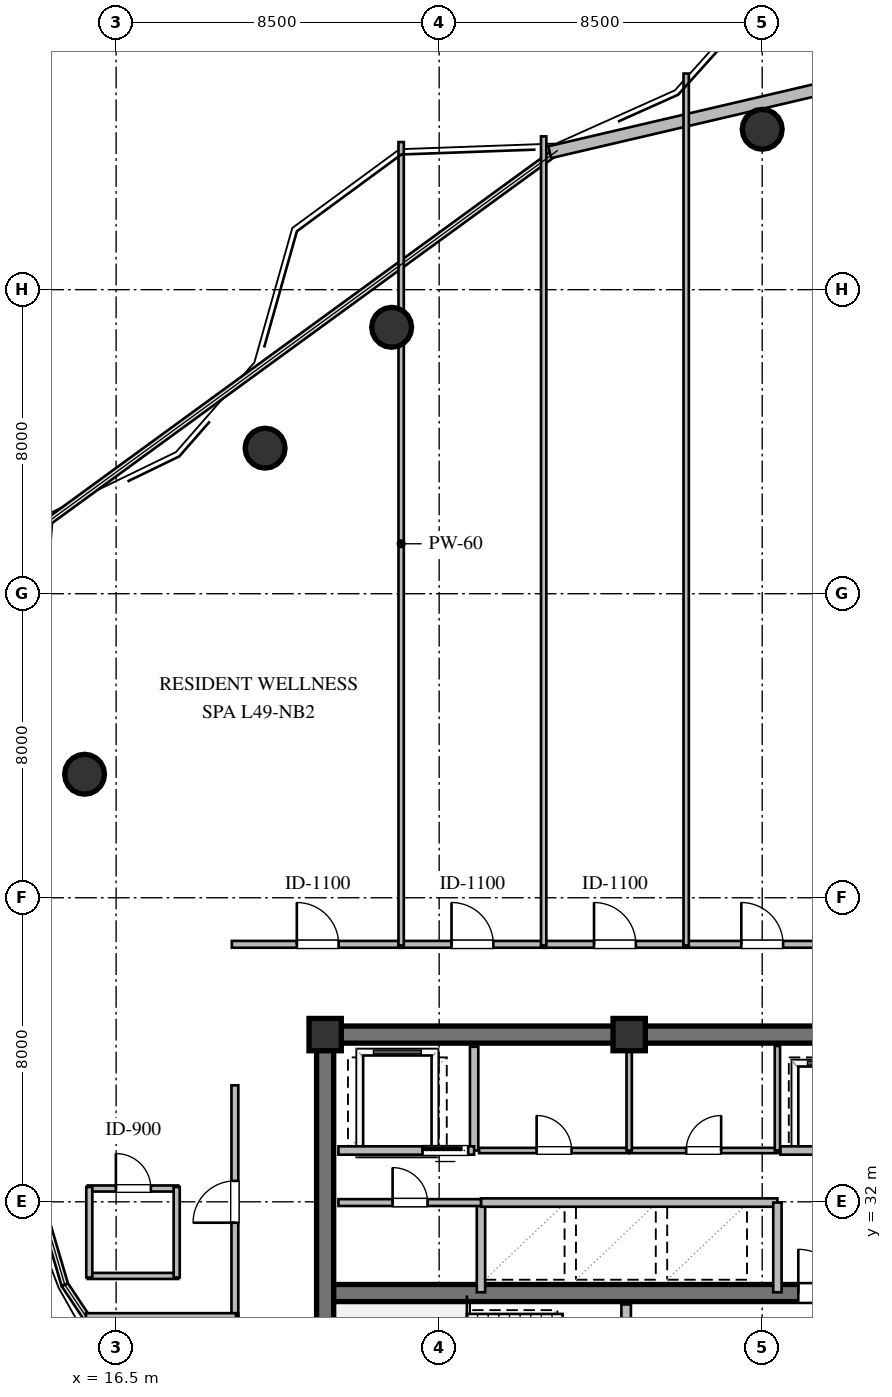
"""IFC4 building model, lengths in metres.
Left out: names, types, materials, properties, quantities, classifications, styles, units other than length and angle.
Written with IfcOpenShell. Run it as: python <this file> out.ifc"""

import sys

from ifc_helpers import new_model, si_unit, direction, frame, frame_2d, origin, origin_2d, place, context, subcontext, project, spatial, rectangle, circle, extrude, element, fill, save


model = new_model("IFC4")
c1 = context("Model", 3, precision=1e-05, world=origin(), true_north=direction((0.0, 1.0)))
c2 = subcontext(c1, "Body", "Model", "MODEL_VIEW")
j1 = project(units=[si_unit("LENGTHUNIT", "METRE"), si_unit("PLANEANGLEUNIT", "RADIAN")], contexts=[c1])
p1 = place(None, origin())
s1 = spatial("IfcSite", under=j1, at=p1, CompositionType="ELEMENT")
p2 = place(p1, origin())
s2 = spatial("IfcBuilding", under=s1, at=p2, CompositionType="ELEMENT")
p3 = place(p2, frame((0.0, 0.0, 187.2)))
s3 = spatial("IfcBuildingStorey", under=s2, at=p3, CompositionType="ELEMENT", Elevation=187.2)
p4 = place(p3, frame((21.775, 36.4, 0.0), z_axis=(0.0, 0.0, 1.0), x_axis=(1.0, 0.0, 0.0)))
e1 = element("IfcWall", 1, at=p4, inside=s3, PredefinedType="SHEAR", context=c2, shape_type="SweptSolid", body=[
    extrude(rectangle(XDim=22.45, YDim=0.45, at=frame_2d((11.225, 0.0))), origin(), (0.0, 0.0, 1.0), 3.28),
])
p5 = place(p3, frame((22.0, 23.825, 0.0), z_axis=(0.0, 0.0, 1.0), x_axis=(0.0, 1.0, 0.0)))
e2 = element("IfcWall", 2, at=p5, inside=s3, PredefinedType="SHEAR", context=c2, shape_type="SweptSolid", body=[
    extrude(rectangle(XDim=12.35, YDim=0.45, at=frame_2d((6.175, 0.0))), origin(), (0.0, 0.0, 1.0), 3.28),
])
p6 = place(p3, frame((22.225, 29.6, 0.0), z_axis=(0.0, 0.0, 1.0), x_axis=(1.0, 0.0, 0.0)))
e3 = element("IfcWall", 3, at=p6, inside=s3, PredefinedType="SHEAR", context=c2, shape_type="SweptSolid", body=[
    extrude(rectangle(XDim=21.55, YDim=0.45, at=frame_2d((10.775, 0.0))), origin(), (0.0, 0.0, 1.0), 3.28),
])
p7 = place(p6, frame((12.225, 0.0, 0.0)))
e4 = element("IfcOpeningElement", 4, at=p7, cuts=e3, PredefinedType="OPENING", context=c2, shape_type="SweptSolid", body=[
    extrude(rectangle(XDim=1.15, YDim=2.1, at=frame_2d((0.575, 1.05))), frame((0.0, 0.235, 0.0), z_axis=(0.0, -1.0, 0.0), x_axis=(1.0, 0.0, 0.0)), (0.0, 0.0, 1.0), 0.47),
])
for number, where, z_axis, x_axis in (
    (5, (30.0, 36.4, 0.0), (0.0, 0.0, 1.0), (1.0, 0.0, 0.0)),
    (6, (22.0, 36.4, 0.0), (0.0, 0.0, 1.0), (1.0, 0.0, 0.0)),
):
    element("IfcColumn", number, at=place(p3, frame(where, z_axis=z_axis, x_axis=x_axis)), inside=s3, PredefinedType="COLUMN", context=c2, shape_type="SweptSolid", body=[
        extrude(rectangle(XDim=0.85, YDim=0.85, at=origin_2d()), origin(), (0.0, 0.0, 1.0), 3.6),
    ])
for number, where, z_axis, x_axis in (
    (7, (33.5, 60.22, -0.24), (0.0, 0.0, 1.0), (1.0, 0.0, 0.0)),
    (8, (23.75, 55.01, -0.24), (0.0, 0.0, 1.0), (1.0, 0.0, 0.0)),
    (9, (20.42, 51.83, -0.24), (0.0, 0.0, 1.0), (1.0, 0.0, 0.0)),
    (10, (15.67, 43.25, -0.24), (0.0, 0.0, 1.0), (1.0, 0.0, 0.0)),
):
    element("IfcColumn", number, at=place(p3, frame(where, z_axis=z_axis, x_axis=x_axis)), inside=s3, PredefinedType="COLUMN", context=c2, shape_type="SweptSolid", body=[
        extrude(circle(Radius=0.525, at=origin_2d()), origin(), (0.0, 0.0, 1.0), 3.84),
    ])
p8 = place(p3, frame((27.909, 59.617, 0.0), z_axis=(0.0, 0.0, 1.0), x_axis=(0.973753606594, 0.227604731158, 0.0)))
e11 = element("IfcWall", 11, at=p8, inside=s3, PredefinedType="STANDARD", context=c2, shape_type="SweptSolid", body=[
    extrude(rectangle(XDim=17.817, YDim=0.32, at=frame_2d((8.908, 0.0))), origin(), (0.0, 0.0, 1.0), 3.28),
])
p9 = place(p8, frame((8.109, 0.0, 1.05)))
e12 = element("IfcOpeningElement", 12, at=p9, cuts=e11, PredefinedType="OPENING", context=c2, shape_type="SweptSolid", body=[
    extrude(rectangle(XDim=1.6, YDim=1.5, at=frame_2d((0.8, 0.75))), frame((0.0, 0.17, 0.0), z_axis=(0.0, -1.0, 0.0), x_axis=(1.0, 0.0, 0.0)), (0.0, 0.0, 1.0), 0.34),
])
p10 = place(p3, frame((29.92, 23.9, 0.0), z_axis=(0.0, 0.0, 1.0), x_axis=(0.0, 1.0, 0.0)))
e13 = element("IfcWall", 13, at=p10, inside=s3, PredefinedType="SOLIDWALL", context=c2, shape_type="SweptSolid", body=[
    extrude(rectangle(XDim=5.4, YDim=0.25, at=frame_2d((2.7, 0.0))), origin(), (0.0, 0.0, 1.0), 3.28),
])
p11 = place(p10, frame((3.421, 0.0, 0.0)))
e14 = element("IfcOpeningElement", 14, at=p11, cuts=e13, PredefinedType="OPENING", context=c2, shape_type="SweptSolid", body=[
    extrude(rectangle(XDim=1.15, YDim=2.1, at=frame_2d((0.575, 1.05))), frame((0.0, 0.135, 0.0), z_axis=(0.0, -1.0, 0.0), x_axis=(1.0, 0.0, 0.0)), (0.0, 0.0, 1.0), 0.27),
])
p12 = place(p3, frame((25.92, 33.35, 0.0), z_axis=(0.0, 0.0, 1.0), x_axis=(0.0, 1.0, 0.0)))
e15 = element("IfcWall", 15, at=p12, inside=s3, PredefinedType="SOLIDWALL", context=c2, shape_type="SweptSolid", body=[
    extrude(rectangle(XDim=2.73, YDim=0.22, at=frame_2d((1.365, 0.0))), origin(), (0.0, 0.0, 1.0), 3.28),
])
p13 = place(p3, frame((22.35, 33.35, 0.0), z_axis=(0.0, 0.0, 1.0), x_axis=(1.0, 0.0, 0.0)))
e16 = element("IfcWall", 16, at=p13, inside=s3, PredefinedType="SOLIDWALL", context=c2, shape_type="SweptSolid", body=[
    extrude(rectangle(XDim=3.57, YDim=0.22, at=frame_2d((1.785, 0.0))), origin(), (0.0, 0.0, 1.0), 3.28),
])
p14 = place(p13, frame((2.213, 0.0, 0.0)))
e17 = element("IfcOpeningElement", 17, at=p14, cuts=e16, PredefinedType="OPENING", context=c2, shape_type="SweptSolid", body=[
    extrude(rectangle(XDim=1.2, YDim=2.1, at=frame_2d((0.6, 1.05))), frame((0.0, 0.12, 0.0), z_axis=(0.0, -1.0, 0.0), x_axis=(1.0, 0.0, 0.0)), (0.0, 0.0, 1.0), 0.24),
])
p15 = place(p3, frame((26.1, 29.62, 0.0), z_axis=(0.0, 0.0, 1.0), x_axis=(0.0, 1.0, 0.0)))
e18 = element("IfcWall", 18, at=p15, inside=s3, PredefinedType="SOLIDWALL", context=c2, shape_type="SweptSolid", body=[
    extrude(rectangle(XDim=2.36, YDim=0.22, at=frame_2d((1.18, 0.0))), origin(), (0.0, 0.0, 1.0), 3.28),
])
p16 = place(p3, frame((26.1, 31.98, 0.0), z_axis=(0.0, 0.0, 1.0), x_axis=(1.0, 0.0, 0.0)))
e19 = element("IfcWall", 19, at=p16, inside=s3, PredefinedType="SOLIDWALL", context=c2, shape_type="SweptSolid", body=[
    extrude(rectangle(XDim=7.8, YDim=0.22, at=frame_2d((3.9, 0.0))), origin(), (0.0, 0.0, 1.0), 3.28),
])
p17 = place(p3, frame((33.9, 29.62, 0.0), z_axis=(0.0, 0.0, 1.0), x_axis=(0.0, 1.0, 0.0)))
e20 = element("IfcWall", 20, at=p17, inside=s3, PredefinedType="SOLIDWALL", context=c2, shape_type="SweptSolid", body=[
    extrude(rectangle(XDim=2.36, YDim=0.22, at=frame_2d((1.18, 0.0))), origin(), (0.0, 0.0, 1.0), 3.28),
])
p18 = place(p3, frame((26.05, 33.35, 0.0), z_axis=(0.0, 0.0, 1.0), x_axis=(1.0, 0.0, 0.0)))
e21 = element("IfcWall", 21, at=p18, inside=s3, PredefinedType="PARTITIONING", context=c2, shape_type="SweptSolid", body=[
    extrude(rectangle(XDim=3.95, YDim=0.14, at=frame_2d((1.975, 0.0))), origin(), (0.0, 0.0, 1.0), 3.28),
])
p19 = place(p18, frame((1.515, 0.0, 0.0)))
e22 = element("IfcOpeningElement", 22, at=p19, cuts=e21, PredefinedType="OPENING", context=c2, shape_type="SweptSolid", body=[
    extrude(rectangle(XDim=0.92, YDim=2.1, at=frame_2d((0.46, 1.05))), frame((0.0, 0.08, 0.0), z_axis=(0.0, -1.0, 0.0), x_axis=(1.0, 0.0, 0.0)), (0.0, 0.0, 1.0), 0.16),
])
p20 = place(p3, frame((30.0, 33.35, 0.0), z_axis=(0.0, 0.0, 1.0), x_axis=(1.0, 0.0, 0.0)))
e23 = element("IfcWall", 23, at=p20, inside=s3, PredefinedType="PARTITIONING", context=c2, shape_type="SweptSolid", body=[
    extrude(rectangle(XDim=3.92, YDim=0.14, at=frame_2d((1.96, 0.0))), origin(), (0.0, 0.0, 1.0), 3.28),
])
p21 = place(p20, frame((1.5, 0.0, 0.0)))
e24 = element("IfcOpeningElement", 24, at=p21, cuts=e23, PredefinedType="OPENING", context=c2, shape_type="SweptSolid", body=[
    extrude(rectangle(XDim=0.92, YDim=2.1, at=frame_2d((0.46, 1.05))), frame((0.0, 0.08, 0.0), z_axis=(0.0, -1.0, 0.0), x_axis=(1.0, 0.0, 0.0)), (0.0, 0.0, 1.0), 0.16),
])
for number, where, z_axis, x_axis in (
    (25, (30.0, 33.35, 0.0), (0.0, 0.0, 1.0), (0.0, 1.0, 0.0)),
    (26, (33.9, 33.35, 0.0), (0.0, 0.0, 1.0), (0.0, 1.0, 0.0)),
):
    element("IfcWall", number, at=place(p3, frame(where, z_axis=z_axis, x_axis=x_axis)), inside=s3, PredefinedType="PARTITIONING", context=c2, shape_type="SweptSolid", body=[
        extrude(rectangle(XDim=2.75, YDim=0.14, at=frame_2d((1.375, 0.0))), origin(), (0.0, 0.0, 1.0), 3.28),
    ])
p22 = place(p3, frame((33.98, 33.35, 0.0), z_axis=(0.0, 0.0, 1.0), x_axis=(1.0, 0.0, 0.0)))
e27 = element("IfcWall", 27, at=p22, inside=s3, PredefinedType="SOLIDWALL", context=c2, shape_type="SweptSolid", body=[
    extrude(rectangle(XDim=7.54, YDim=0.22, at=frame_2d((3.77, 0.0))), origin(), (0.0, 0.0, 1.0), 3.28),
])
p23 = place(p22, frame((1.335, 0.0, 0.0)))
e28 = element("IfcOpeningElement", 28, at=p23, cuts=e27, PredefinedType="OPENING", context=c2, shape_type="SweptSolid", body=[
    extrude(rectangle(XDim=1.1, YDim=2.1, at=frame_2d((0.55, 1.05))), frame((0.0, 0.12, 0.0), z_axis=(0.0, -1.0, 0.0), x_axis=(1.0, 0.0, 0.0)), (0.0, 0.0, 1.0), 0.24),
])
p24 = place(p22, frame((4.879, 0.0, 0.0)))
e29 = element("IfcOpeningElement", 29, at=p24, cuts=e27, PredefinedType="OPENING", context=c2, shape_type="SweptSolid", body=[
    extrude(rectangle(XDim=1.1, YDim=2.1, at=frame_2d((0.55, 1.05))), frame((0.0, 0.12, 0.0), z_axis=(0.0, -1.0, 0.0), x_axis=(1.0, 0.0, 0.0)), (0.0, 0.0, 1.0), 0.24),
])
p25 = place(p3, frame((22.35, 31.98, 0.0), z_axis=(0.0, 0.0, 1.0), x_axis=(1.0, 0.0, 0.0)))
e30 = element("IfcWall", 30, at=p25, inside=s3, PredefinedType="PARTITIONING", context=c2, shape_type="SweptSolid", body=[
    extrude(rectangle(XDim=3.75, YDim=0.18, at=frame_2d((1.875, 0.0))), origin(), (0.0, 0.0, 1.0), 3.28),
])
p26 = place(p25, frame((1.425, 0.0, 0.0)))
e31 = element("IfcOpeningElement", 31, at=p26, cuts=e30, PredefinedType="OPENING", context=c2, shape_type="SweptSolid", body=[
    extrude(rectangle(XDim=0.92, YDim=2.1, at=frame_2d((0.46, 1.05))), frame((0.0, 0.1, 0.0), z_axis=(0.0, -1.0, 0.0), x_axis=(1.0, 0.0, 0.0)), (0.0, 0.0, 1.0), 0.2),
])
p27 = place(p3, frame((15.754, 30.05, 0.0), z_axis=(0.0, 0.0, 1.0), x_axis=(1.0, 0.0, 0.0)))
e32 = element("IfcWall", 32, at=p27, inside=s3, PredefinedType="PLUMBINGWALL", context=c2, shape_type="SweptSolid", body=[
    extrude(rectangle(XDim=2.38, YDim=0.16, at=frame_2d((1.19, 0.0))), origin(), (0.0, 0.0, 1.0), 3.28),
])
p28 = place(p3, frame((15.754, 32.35, 0.0), z_axis=(0.0, 0.0, 1.0), x_axis=(1.0, 0.0, 0.0)))
e33 = element("IfcWall", 33, at=p28, inside=s3, PredefinedType="PLUMBINGWALL", context=c2, shape_type="SweptSolid", body=[
    extrude(rectangle(XDim=2.38, YDim=0.16, at=frame_2d((1.19, 0.0))), origin(), (0.0, 0.0, 1.0), 3.28),
])
p29 = place(p28, frame((0.74, 0.0, 0.0)))
e34 = element("IfcOpeningElement", 34, at=p29, cuts=e33, PredefinedType="OPENING", context=c2, shape_type="SweptSolid", body=[
    extrude(rectangle(XDim=0.92, YDim=2.1, at=frame_2d((0.46, 1.05))), frame((0.0, 0.09, 0.0), z_axis=(0.0, -1.0, 0.0), x_axis=(1.0, 0.0, 0.0)), (0.0, 0.0, 1.0), 0.18),
])
p30 = place(p3, frame((15.794, 30.01, 0.0), z_axis=(0.0, 0.0, 1.0), x_axis=(0.0, 1.0, 0.0)))
e35 = element("IfcWall", 35, at=p30, inside=s3, PredefinedType="PLUMBINGWALL", context=c2, shape_type="SweptSolid", body=[
    extrude(rectangle(XDim=2.38, YDim=0.16, at=frame_2d((1.19, 0.0))), origin(), (0.0, 0.0, 1.0), 3.28),
])
p31 = place(p3, frame((18.094, 30.01, 0.0), z_axis=(0.0, 0.0, 1.0), x_axis=(0.0, 1.0, 0.0)))
e36 = element("IfcWall", 36, at=p31, inside=s3, PredefinedType="PLUMBINGWALL", context=c2, shape_type="SweptSolid", body=[
    extrude(rectangle(XDim=2.38, YDim=0.16, at=frame_2d((1.19, 0.0))), origin(), (0.0, 0.0, 1.0), 2.737),
])
p32 = place(p3, frame((19.545, 38.775, 0.0), z_axis=(0.0, 0.0, 1.0), x_axis=(1.0, 0.0, 0.0)))
e37 = element("IfcWall", 37, at=p32, inside=s3, PredefinedType="PARTITIONING", context=c2, shape_type="SweptSolid", body=[
    extrude(rectangle(XDim=4.52, YDim=0.18, at=frame_2d((2.26, 0.0))), origin(), (0.0, 0.0, 1.0), 3.28),
])
p33 = place(p32, frame((1.71, 0.0, 0.0)))
e38 = element("IfcOpeningElement", 38, at=p33, cuts=e37, PredefinedType="OPENING", context=c2, shape_type="SweptSolid", body=[
    extrude(rectangle(XDim=1.1, YDim=2.1, at=frame_2d((0.55, 1.05))), frame((0.0, 0.1, 0.0), z_axis=(0.0, -1.0, 0.0), x_axis=(1.0, 0.0, 0.0)), (0.0, 0.0, 1.0), 0.2),
])
p34 = place(p3, frame((23.935, 38.775, 0.0), z_axis=(0.0, 0.0, 1.0), x_axis=(1.0, 0.0, 0.0)))
e39 = element("IfcWall", 39, at=p34, inside=s3, PredefinedType="PARTITIONING", context=c2, shape_type="SweptSolid", body=[
    extrude(rectangle(XDim=3.88, YDim=0.18, at=frame_2d((1.94, 0.0))), origin(), (0.0, 0.0, 1.0), 3.28),
])
p35 = place(p34, frame((1.39, 0.0, 0.0)))
e40 = element("IfcOpeningElement", 40, at=p35, cuts=e39, PredefinedType="OPENING", context=c2, shape_type="SweptSolid", body=[
    extrude(rectangle(XDim=1.1, YDim=2.1, at=frame_2d((0.55, 1.05))), frame((0.0, 0.1, 0.0), z_axis=(0.0, -1.0, 0.0), x_axis=(1.0, 0.0, 0.0)), (0.0, 0.0, 1.0), 0.2),
])
p36 = place(p3, frame((27.685, 38.775, 0.0), z_axis=(0.0, 0.0, 1.0), x_axis=(1.0, 0.0, 0.0)))
e41 = element("IfcWall", 41, at=p36, inside=s3, PredefinedType="PARTITIONING", context=c2, shape_type="SweptSolid", body=[
    extrude(rectangle(XDim=3.88, YDim=0.18, at=frame_2d((1.94, 0.0))), origin(), (0.0, 0.0, 1.0), 3.28),
])
p37 = place(p36, frame((1.39, 0.0, 0.0)))
e42 = element("IfcOpeningElement", 42, at=p37, cuts=e41, PredefinedType="OPENING", context=c2, shape_type="SweptSolid", body=[
    extrude(rectangle(XDim=1.1, YDim=2.1, at=frame_2d((0.55, 1.05))), frame((0.0, 0.1, 0.0), z_axis=(0.0, -1.0, 0.0), x_axis=(1.0, 0.0, 0.0)), (0.0, 0.0, 1.0), 0.2),
])
p38 = place(p3, frame((31.435, 38.775, 0.0), z_axis=(0.0, 0.0, 1.0), x_axis=(1.0, 0.0, 0.0)))
e43 = element("IfcWall", 43, at=p38, inside=s3, PredefinedType="PARTITIONING", context=c2, shape_type="SweptSolid", body=[
    extrude(rectangle(XDim=4.13, YDim=0.18, at=frame_2d((2.065, 0.0))), origin(), (0.0, 0.0, 1.0), 3.28),
])
p39 = place(p38, frame((1.515, 0.0, 0.0)))
e44 = element("IfcOpeningElement", 44, at=p39, cuts=e43, PredefinedType="OPENING", context=c2, shape_type="SweptSolid", body=[
    extrude(rectangle(XDim=1.1, YDim=2.1, at=frame_2d((0.55, 1.05))), frame((0.0, 0.1, 0.0), z_axis=(0.0, -1.0, 0.0), x_axis=(1.0, 0.0, 0.0)), (0.0, 0.0, 1.0), 0.2),
])
p40 = place(p3, frame((19.625, 23.496, 0.0), z_axis=(0.0, 0.0, 1.0), x_axis=(0.0, 1.0, 0.0)))
e45 = element("IfcWall", 45, at=p40, inside=s3, PredefinedType="PARTITIONING", context=c2, shape_type="SweptSolid", body=[
    extrude(rectangle(XDim=5.569, YDim=0.18, at=frame_2d((2.784, 0.0))), origin(), (0.0, 0.0, 1.0), 2.737),
])
p41 = place(p40, frame((2.234, 0.0, 0.0)))
e46 = element("IfcOpeningElement", 46, at=p41, cuts=e45, PredefinedType="OPENING", context=c2, shape_type="SweptSolid", body=[
    extrude(rectangle(XDim=1.1, YDim=2.1, at=frame_2d((0.55, 1.05))), frame((0.0, 0.1, 0.0), z_axis=(0.0, -1.0, 0.0), x_axis=(1.0, 0.0, 0.0)), (0.0, 0.0, 1.0), 0.2),
])
p42 = place(p3, frame((19.625, 28.935, 0.0), z_axis=(0.0, 0.0, 1.0), x_axis=(0.0, 1.0, 0.0)))
e47 = element("IfcWall", 47, at=p42, inside=s3, PredefinedType="PARTITIONING", context=c2, shape_type="SweptSolid", body=[
    extrude(rectangle(XDim=6.13, YDim=0.18, at=frame_2d((3.065, 0.0))), origin(), (0.0, 0.0, 1.0), 3.28),
])
p43 = place(p42, frame((2.515, 0.0, 0.0)))
e48 = element("IfcOpeningElement", 48, at=p43, cuts=e47, PredefinedType="OPENING", context=c2, shape_type="SweptSolid", body=[
    extrude(rectangle(XDim=1.1, YDim=2.1, at=frame_2d((0.55, 1.05))), frame((0.0, 0.1, 0.0), z_axis=(0.0, -1.0, 0.0), x_axis=(1.0, 0.0, 0.0)), (0.0, 0.0, 1.0), 0.2),
])
p44 = place(p3, frame((24.0, 59.884, 0.0), z_axis=(0.0, 0.0, 1.0), x_axis=(0.0, -1.0, 0.0)))
e49 = element("IfcWall", 49, at=p44, inside=s3, PredefinedType="PARTITIONING", context=c2, shape_type="SweptSolid", body=[
    extrude(rectangle(XDim=21.139, YDim=0.14, at=frame_2d((10.569, 0.0))), origin(), (0.0, 0.0, 1.0), 2.81),
])
p45 = place(p3, frame((27.75, 60.033, 0.0), z_axis=(0.0, 0.0, 1.0), x_axis=(0.0, -1.0, 0.0)))
e50 = element("IfcWall", 50, at=p45, inside=s3, PredefinedType="PARTITIONING", context=c2, shape_type="SweptSolid", body=[
    extrude(rectangle(XDim=21.288, YDim=0.14, at=frame_2d((10.644, 0.0))), origin(), (0.0, 0.0, 1.0), 3.28),
])
p46 = place(p3, frame((31.5, 61.687, 0.0), z_axis=(0.0, 0.0, 1.0), x_axis=(0.0, -1.0, 0.0)))
e51 = element("IfcWall", 51, at=p46, inside=s3, PredefinedType="PARTITIONING", context=c2, shape_type="SweptSolid", body=[
    extrude(rectangle(XDim=22.942, YDim=0.14, at=frame_2d((11.471, 0.0))), origin(), (0.0, 0.0, 1.0), 3.28),
])
p47 = place(p3, frame((15.705, 29.0, 0.0), z_axis=(0.0, 0.0, 1.0), x_axis=(1.0, 0.0, 0.0)))
e52 = element("IfcWall", 52, at=p47, inside=s3, PredefinedType="PARTITIONING", context=c2, shape_type="SweptSolid", body=[
    extrude(rectangle(XDim=3.95, YDim=0.14, at=frame_2d((1.975, 0.0))), origin(), (0.0, 0.0, 1.0), 3.28),
])
p48 = place(p7, origin())
e53 = element("IfcDoor", 53, at=p48, inside=s3, OperationType="SINGLE_SWING_LEFT", PredefinedType="DOOR", context=c2, shape_type="SweptSolid", body=[
    extrude(rectangle(XDim=1.15, YDim=2.1, at=frame_2d((0.575, 1.05))), frame((0.0, 0.025, 0.0), z_axis=(0.0, -1.0, 0.0), x_axis=(1.0, 0.0, 0.0)), (0.0, 0.0, 1.0), 0.05),
])
fill(e4, e53)
p49 = place(p14, origin())
e54 = element("IfcDoor", 54, at=p49, inside=s3, OperationType="SLIDING_TO_LEFT", PredefinedType="DOOR", context=c2, shape_type="SweptSolid", body=[
    extrude(rectangle(XDim=1.2, YDim=2.1, at=frame_2d((0.6, 1.05))), frame((0.0, 0.025, 0.0), z_axis=(0.0, -1.0, 0.0), x_axis=(1.0, 0.0, 0.0)), (0.0, 0.0, 1.0), 0.05),
])
fill(e17, e54)
p50 = place(p19, origin())
e55 = element("IfcDoor", 55, at=p50, inside=s3, OperationType="SINGLE_SWING_LEFT", PredefinedType="DOOR", context=c2, shape_type="SweptSolid", body=[
    extrude(rectangle(XDim=0.92, YDim=2.1, at=frame_2d((0.46, 1.05))), frame((0.0, 0.025, 0.0), z_axis=(0.0, -1.0, 0.0), x_axis=(1.0, 0.0, 0.0)), (0.0, 0.0, 1.0), 0.05),
])
fill(e22, e55)
p51 = place(p21, origin())
e56 = element("IfcDoor", 56, at=p51, inside=s3, OperationType="SINGLE_SWING_RIGHT", PredefinedType="DOOR", context=c2, shape_type="SweptSolid", body=[
    extrude(rectangle(XDim=0.92, YDim=2.1, at=frame_2d((0.46, 1.05))), frame((0.0, 0.025, 0.0), z_axis=(0.0, -1.0, 0.0), x_axis=(1.0, 0.0, 0.0)), (0.0, 0.0, 1.0), 0.05),
])
fill(e24, e56)
p52 = place(p26, origin())
e57 = element("IfcDoor", 57, at=p52, inside=s3, OperationType="SINGLE_SWING_LEFT", PredefinedType="DOOR", context=c2, shape_type="SweptSolid", body=[
    extrude(rectangle(XDim=0.92, YDim=2.1, at=frame_2d((0.46, 1.05))), frame((0.0, 0.025, 0.0), z_axis=(0.0, -1.0, 0.0), x_axis=(1.0, 0.0, 0.0)), (0.0, 0.0, 1.0), 0.05),
])
fill(e31, e57)
p53 = place(p29, origin())
e58 = element("IfcDoor", 58, at=p53, inside=s3, OperationType="SINGLE_SWING_LEFT", PredefinedType="DOOR", context=c2, shape_type="SweptSolid", body=[
    extrude(rectangle(XDim=0.92, YDim=2.1, at=frame_2d((0.46, 1.05))), frame((0.0, 0.025, 0.0), z_axis=(0.0, -1.0, 0.0), x_axis=(1.0, 0.0, 0.0)), (0.0, 0.0, 1.0), 0.05),
])
fill(e34, e58)
p54 = place(p33, origin())
e59 = element("IfcDoor", 59, at=p54, inside=s3, OperationType="SINGLE_SWING_LEFT", PredefinedType="DOOR", context=c2, shape_type="SweptSolid", body=[
    extrude(rectangle(XDim=1.1, YDim=2.1, at=frame_2d((0.55, 1.05))), frame((0.0, 0.025, 0.0), z_axis=(0.0, -1.0, 0.0), x_axis=(1.0, 0.0, 0.0)), (0.0, 0.0, 1.0), 0.05),
])
fill(e38, e59)
p55 = place(p35, origin())
e60 = element("IfcDoor", 60, at=p55, inside=s3, OperationType="SINGLE_SWING_LEFT", PredefinedType="DOOR", context=c2, shape_type="SweptSolid", body=[
    extrude(rectangle(XDim=1.1, YDim=2.1, at=frame_2d((0.55, 1.05))), frame((0.0, 0.025, 0.0), z_axis=(0.0, -1.0, 0.0), x_axis=(1.0, 0.0, 0.0)), (0.0, 0.0, 1.0), 0.05),
])
fill(e40, e60)
p56 = place(p37, origin())
e61 = element("IfcDoor", 61, at=p56, inside=s3, OperationType="SINGLE_SWING_LEFT", PredefinedType="DOOR", context=c2, shape_type="SweptSolid", body=[
    extrude(rectangle(XDim=1.1, YDim=2.1, at=frame_2d((0.55, 1.05))), frame((0.0, 0.025, 0.0), z_axis=(0.0, -1.0, 0.0), x_axis=(1.0, 0.0, 0.0)), (0.0, 0.0, 1.0), 0.05),
])
fill(e42, e61)
p57 = place(p39, origin())
e62 = element("IfcDoor", 62, at=p57, inside=s3, OperationType="SINGLE_SWING_LEFT", PredefinedType="DOOR", context=c2, shape_type="SweptSolid", body=[
    extrude(rectangle(XDim=1.1, YDim=2.1, at=frame_2d((0.55, 1.05))), frame((0.0, 0.025, 0.0), z_axis=(0.0, -1.0, 0.0), x_axis=(1.0, 0.0, 0.0)), (0.0, 0.0, 1.0), 0.05),
])
fill(e44, e62)
p58 = place(p43, origin())
e63 = element("IfcDoor", 63, at=p58, inside=s3, OperationType="SINGLE_SWING_LEFT", PredefinedType="DOOR", context=c2, shape_type="SweptSolid", body=[
    extrude(rectangle(XDim=1.1, YDim=2.1, at=frame_2d((0.55, 1.05))), frame((0.0, 0.025, 0.0), z_axis=(0.0, -1.0, 0.0), x_axis=(1.0, 0.0, 0.0)), (0.0, 0.0, 1.0), 0.05),
])
fill(e48, e63)
save(model, sys.argv[1])
